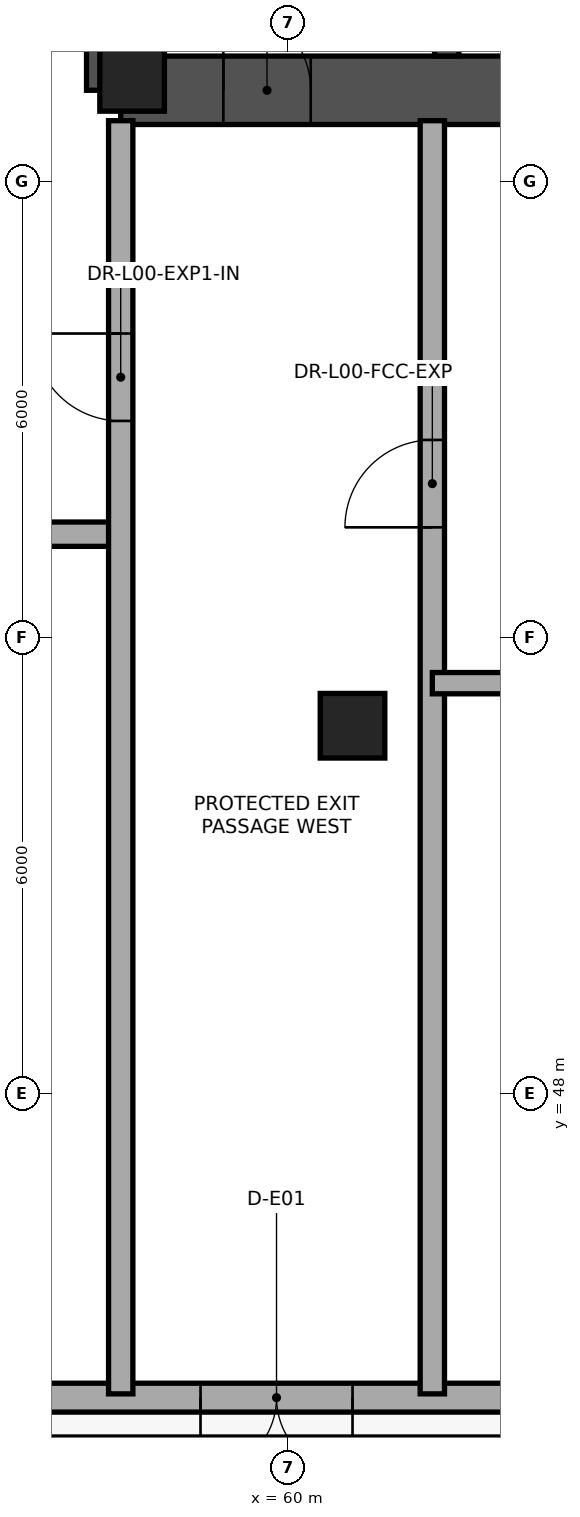
"""IFC4 building model, lengths in metres.
Left out: names, types, materials, properties, quantities, classifications, styles, units other than length and angle.
Written with IfcOpenShell. Run it as: python <this file> out.ifc"""

import sys

from ifc_helpers import new_model, si_unit, direction, frame, frame_2d, origin, origin_2d, place, context, subcontext, project, spatial, rectangle, extrude, element, fill, save


model = new_model("IFC4")
c1 = context("Model", 3, precision=1e-05, world=origin(), true_north=direction((0.0, 1.0)))
c2 = subcontext(c1, "Body", "Model", "MODEL_VIEW")
j1 = project(units=[si_unit("LENGTHUNIT", "METRE"), si_unit("PLANEANGLEUNIT", "RADIAN")], contexts=[c1])
p1 = place(None, origin())
s1 = spatial("IfcSite", under=j1, at=p1, CompositionType="ELEMENT")
p2 = place(p1, origin())
s2 = spatial("IfcBuilding", under=s1, at=p2, CompositionType="ELEMENT")
p3 = place(p2, origin())
s3 = spatial("IfcBuildingStorey", under=s2, at=p3, CompositionType="ELEMENT", Elevation=0.0)
p4 = place(p3, frame((57.8, 61.2, 0.0), z_axis=(0.0, 0.0, 1.0), x_axis=(1.0, 0.0, 0.0)))
e1 = element("IfcWall", 1, at=p4, inside=s3, PredefinedType="SHEAR", context=c2, shape_type="SweptSolid", body=[
    extrude(rectangle(XDim=16.4, YDim=0.9, at=frame_2d((8.2, 0.0))), origin(), (0.0, 0.0, 1.0), 5.4),
])
p5 = place(p4, frame((1.35, 0.0, 0.0)))
e2 = element("IfcOpeningElement", 2, at=p5, cuts=e1, PredefinedType="OPENING", context=c2, shape_type="SweptSolid", body=[
    extrude(rectangle(XDim=1.15, YDim=2.15, at=frame_2d((0.575, 1.075))), frame((0.0, 0.46, 0.0), z_axis=(0.0, -1.0, 0.0), x_axis=(1.0, 0.0, 0.0)), (0.0, 0.0, 1.0), 0.92),
])
p6 = place(p4, frame((6.1, 0.0, 0.0)))
e3 = element("IfcOpeningElement", 3, at=p6, cuts=e1, PredefinedType="OPENING", context=c2, shape_type="SweptSolid", body=[
    extrude(rectangle(XDim=1.6, YDim=2.15, at=frame_2d((0.8, 1.075))), frame((0.0, 0.46, 0.0), z_axis=(0.0, -1.0, 0.0), x_axis=(1.0, 0.0, 0.0)), (0.0, 0.0, 1.0), 0.92),
])
p7 = place(p4, frame((13.55, 0.0, 0.0)))
e4 = element("IfcOpeningElement", 4, at=p7, cuts=e1, PredefinedType="OPENING", context=c2, shape_type="SweptSolid", body=[
    extrude(rectangle(XDim=1.15, YDim=2.15, at=frame_2d((0.575, 1.075))), frame((0.0, 0.46, 0.0), z_axis=(0.0, -1.0, 0.0), x_axis=(1.0, 0.0, 0.0)), (0.0, 0.0, 1.0), 0.92),
])
p8 = place(p3, frame((57.8, 74.8, 0.0), z_axis=(0.0, 0.0, 1.0), x_axis=(0.0, -1.0, 0.0)))
e5 = element("IfcWall", 5, at=p8, inside=s3, PredefinedType="SHEAR", context=c2, shape_type="SweptSolid", body=[
    extrude(rectangle(XDim=13.6, YDim=0.9, at=frame_2d((6.8, 0.0))), origin(), (0.0, 0.0, 1.0), 5.4),
])
p9 = place(p8, frame((0.85, 0.0, 0.0)))
e6 = element("IfcOpeningElement", 6, at=p9, cuts=e5, PredefinedType="OPENING", context=c2, shape_type="SweptSolid", body=[
    extrude(rectangle(XDim=0.92, YDim=2.05, at=frame_2d((0.46, 1.025))), frame((0.0, 0.46, 0.0), z_axis=(0.0, -1.0, 0.0), x_axis=(1.0, 0.0, 0.0)), (0.0, 0.0, 1.0), 0.92),
])
p10 = place(p8, frame((2.55, 0.0, 0.0)))
e7 = element("IfcOpeningElement", 7, at=p10, cuts=e5, PredefinedType="OPENING", context=c2, shape_type="SweptSolid", body=[
    extrude(rectangle(XDim=1.6, YDim=2.3, at=frame_2d((0.8, 1.15))), frame((0.0, 0.46, 0.0), z_axis=(0.0, -1.0, 0.0), x_axis=(1.0, 0.0, 0.0)), (0.0, 0.0, 1.0), 0.92),
])
p11 = place(p3, frame((62.09, 61.65, 0.0), z_axis=(0.0, 0.0, 1.0), x_axis=(0.0, 1.0, 0.0)))
e8 = element("IfcWall", 8, at=p11, inside=s3, PredefinedType="SHEAR", context=c2, shape_type="SweptSolid", body=[
    extrude(rectangle(XDim=12.7, YDim=0.32, at=frame_2d((6.35, 0.0))), origin(), (0.0, 0.0, 1.0), 5.4),
])
p12 = place(p11, frame((0.55, 0.0, 0.0)))
e9 = element("IfcOpeningElement", 9, at=p12, cuts=e8, PredefinedType="OPENING", context=c2, shape_type="SweptSolid", body=[
    extrude(rectangle(XDim=1.15, YDim=2.15, at=frame_2d((0.575, 1.075))), frame((0.0, 0.17, 0.0), z_axis=(0.0, -1.0, 0.0), x_axis=(1.0, 0.0, 0.0)), (0.0, 0.0, 1.0), 0.34),
])
for number, where, z_axis, x_axis in (
    (10, (57.95, 61.35, 0.0), (0.0, 0.0, 1.0), (1.0, 0.0, 0.0)),
    (11, (60.85, 52.84, 0.0), (0.0, 0.0, 1.0), (1.0, 0.0, 0.0)),
):
    element("IfcColumn", number, at=place(p3, frame(where, z_axis=z_axis, x_axis=x_axis)), inside=s3, PredefinedType="COLUMN", context=c2, shape_type="SweptSolid", body=[
        extrude(rectangle(XDim=0.85, YDim=0.85, at=origin_2d()), origin(), (0.0, 0.0, 1.0), 5.4),
    ])
p13 = place(p3, frame((83.5, 44.0, 0.0), z_axis=(0.0, 0.0, 1.0), x_axis=(-1.0, 0.0, 0.0)))
e12 = element("IfcWall", 12, at=p13, inside=s3, PredefinedType="STANDARD", context=c2, shape_type="SweptSolid", body=[
    extrude(rectangle(XDim=35.0, YDim=0.38, at=frame_2d((17.5, 0.0))), origin(), (0.0, 0.0, 1.0), 4.08),
])
p14 = place(p13, frame((3.5, 0.0, 0.0)))
e13 = element("IfcOpeningElement", 13, at=p14, cuts=e12, PredefinedType="OPENING", context=c2, shape_type="SweptSolid", body=[
    extrude(rectangle(XDim=2.0, YDim=2.25, at=frame_2d((1.0, 1.125))), frame((0.0, 0.2, 0.0), z_axis=(0.0, -1.0, 0.0), x_axis=(1.0, 0.0, 0.0)), (0.0, 0.0, 1.0), 0.4),
])
p15 = place(p13, frame((10.35, 0.0, 0.0)))
e14 = element("IfcOpeningElement", 14, at=p15, cuts=e12, PredefinedType="OPENING", context=c2, shape_type="SweptSolid", body=[
    extrude(rectangle(XDim=2.0, YDim=2.25, at=frame_2d((1.0, 1.125))), frame((0.0, 0.2, 0.0), z_axis=(0.0, -1.0, 0.0), x_axis=(1.0, 0.0, 0.0)), (0.0, 0.0, 1.0), 0.4),
])
p16 = place(p13, frame((16.4, 0.0, 0.0)))
e15 = element("IfcOpeningElement", 15, at=p16, cuts=e12, PredefinedType="OPENING", context=c2, shape_type="SweptSolid", body=[
    extrude(rectangle(XDim=2.2, YDim=2.6, at=frame_2d((1.1, 1.3))), frame((0.0, 0.2, 0.0), z_axis=(0.0, -1.0, 0.0), x_axis=(1.0, 0.0, 0.0)), (0.0, 0.0, 1.0), 0.4),
])
p17 = place(p13, frame((22.65, 0.0, 0.0)))
e16 = element("IfcOpeningElement", 16, at=p17, cuts=e12, PredefinedType="OPENING", context=c2, shape_type="SweptSolid", body=[
    extrude(rectangle(XDim=2.0, YDim=2.25, at=frame_2d((1.0, 1.125))), frame((0.0, 0.2, 0.0), z_axis=(0.0, -1.0, 0.0), x_axis=(1.0, 0.0, 0.0)), (0.0, 0.0, 1.0), 0.4),
])
p18 = place(p13, frame((29.2, 0.0, 0.0)))
e17 = element("IfcOpeningElement", 17, at=p18, cuts=e12, PredefinedType="OPENING", context=c2, shape_type="SweptSolid", body=[
    extrude(rectangle(XDim=2.0, YDim=2.25, at=frame_2d((1.0, 1.125))), frame((0.0, 0.2, 0.0), z_axis=(0.0, -1.0, 0.0), x_axis=(1.0, 0.0, 0.0)), (0.0, 0.0, 1.0), 0.4),
])
p19 = place(p3, frame((53.04, 55.36, 0.0), z_axis=(0.0, 0.0, 1.0), x_axis=(1.0, 0.0, 0.0)))
e18 = element("IfcWall", 18, at=p19, inside=s3, PredefinedType="STANDARD", context=c2, shape_type="SweptSolid", body=[
    extrude(rectangle(XDim=4.76, YDim=0.32, at=frame_2d((2.38, 0.0))), origin(), (0.0, 0.0, 1.0), 4.08),
])
p20 = place(p19, frame((1.8, 0.0, 0.0)))
e19 = element("IfcOpeningElement", 19, at=p20, cuts=e18, PredefinedType="OPENING", context=c2, shape_type="SweptSolid", body=[
    extrude(rectangle(XDim=1.15, YDim=2.15, at=frame_2d((0.575, 1.075))), frame((0.0, 0.17, 0.0), z_axis=(0.0, -1.0, 0.0), x_axis=(1.0, 0.0, 0.0)), (0.0, 0.0, 1.0), 0.34),
])
p21 = place(p3, frame((57.8, 44.05, 0.0), z_axis=(0.0, 0.0, 1.0), x_axis=(0.0, 1.0, 0.0)))
e20 = element("IfcWall", 20, at=p21, inside=s3, PredefinedType="STANDARD", context=c2, shape_type="SweptSolid", body=[
    extrude(rectangle(XDim=16.75, YDim=0.32, at=frame_2d((8.375, 0.0))), origin(), (0.0, 0.0, 1.0), 4.08),
])
p22 = place(p21, frame((12.8, 0.0, 0.0)))
e21 = element("IfcOpeningElement", 21, at=p22, cuts=e20, PredefinedType="OPENING", context=c2, shape_type="SweptSolid", body=[
    extrude(rectangle(XDim=1.15, YDim=2.15, at=frame_2d((0.575, 1.075))), frame((0.0, 0.17, 0.0), z_axis=(0.0, -1.0, 0.0), x_axis=(1.0, 0.0, 0.0)), (0.0, 0.0, 1.0), 0.34),
])
p23 = place(p3, frame((61.9, 44.05, 0.0), z_axis=(0.0, 0.0, 1.0), x_axis=(0.0, 1.0, 0.0)))
e22 = element("IfcWall", 22, at=p23, inside=s3, PredefinedType="STANDARD", context=c2, shape_type="SweptSolid", body=[
    extrude(rectangle(XDim=16.75, YDim=0.32, at=frame_2d((8.375, 0.0))), origin(), (0.0, 0.0, 1.0), 4.08),
])
p24 = place(p23, frame((11.4, 0.0, 0.0)))
e23 = element("IfcOpeningElement", 23, at=p24, cuts=e22, PredefinedType="OPENING", context=c2, shape_type="SweptSolid", body=[
    extrude(rectangle(XDim=1.15, YDim=2.15, at=frame_2d((0.575, 1.075))), frame((0.0, 0.17, 0.0), z_axis=(0.0, -1.0, 0.0), x_axis=(1.0, 0.0, 0.0)), (0.0, 0.0, 1.0), 0.34),
])
p25 = place(p3, frame((61.9, 53.4, 0.0), z_axis=(0.0, 0.0, 1.0), x_axis=(1.0, 0.0, 0.0)))
e24 = element("IfcWall", 24, at=p25, inside=s3, PredefinedType="STANDARD", context=c2, shape_type="SweptSolid", body=[
    extrude(rectangle(XDim=8.2, YDim=0.28, at=frame_2d((4.1, 0.0))), origin(), (0.0, 0.0, 1.0), 4.08),
])
p26 = place(p25, frame((2.3, 0.0, 0.0)))
e25 = element("IfcOpeningElement", 25, at=p26, cuts=e24, PredefinedType="OPENING", context=c2, shape_type="SweptSolid", body=[
    extrude(rectangle(XDim=1.6, YDim=2.15, at=frame_2d((0.8, 1.075))), frame((0.0, 0.15, 0.0), z_axis=(0.0, -1.0, 0.0), x_axis=(1.0, 0.0, 0.0)), (0.0, 0.0, 1.0), 0.3),
])
p27 = place(p17, origin())
e26 = element("IfcDoor", 26, at=p27, inside=s3, OperationType="DOUBLE_DOOR_SINGLE_SWING", PredefinedType="DOOR", context=c2, shape_type="SweptSolid", body=[
    extrude(rectangle(XDim=2.0, YDim=2.25, at=frame_2d((1.0, 1.125))), frame((0.0, 0.025, 0.0), z_axis=(0.0, -1.0, 0.0), x_axis=(1.0, 0.0, 0.0)), (0.0, 0.0, 1.0), 0.05),
])
fill(e16, e26)
p28 = place(p5, origin())
e27 = element("IfcDoor", 27, at=p28, inside=s3, OperationType="SINGLE_SWING_LEFT", PredefinedType="DOOR", context=c2, shape_type="SweptSolid", body=[
    extrude(rectangle(XDim=1.15, YDim=2.15, at=frame_2d((0.575, 1.075))), frame((0.0, 0.025, 0.0), z_axis=(0.0, -1.0, 0.0), x_axis=(1.0, 0.0, 0.0)), (0.0, 0.0, 1.0), 0.05),
])
fill(e2, e27)
p29 = place(p22, origin())
e28 = element("IfcDoor", 28, at=p29, inside=s3, OperationType="SINGLE_SWING_RIGHT", PredefinedType="DOOR", context=c2, shape_type="SweptSolid", body=[
    extrude(rectangle(XDim=1.15, YDim=2.15, at=frame_2d((0.575, 1.075))), frame((0.0, 0.025, 0.0), z_axis=(0.0, -1.0, 0.0), x_axis=(1.0, 0.0, 0.0)), (0.0, 0.0, 1.0), 0.05),
])
fill(e21, e28)
p30 = place(p24, origin())
e29 = element("IfcDoor", 29, at=p30, inside=s3, OperationType="SINGLE_SWING_LEFT", PredefinedType="DOOR", context=c2, shape_type="SweptSolid", body=[
    extrude(rectangle(XDim=1.15, YDim=2.15, at=frame_2d((0.575, 1.075))), frame((0.0, 0.025, 0.0), z_axis=(0.0, -1.0, 0.0), x_axis=(1.0, 0.0, 0.0)), (0.0, 0.0, 1.0), 0.05),
])
fill(e23, e29)
save(model, sys.argv[1])
